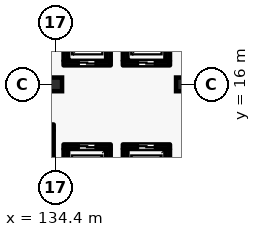
"""IFC4 building model, lengths in metres.
Left out: names, types, materials, properties, quantities, classifications, styles, units other than length and angle.
Written with IfcOpenShell. Run it as: python <this file> out.ifc"""

import sys

from ifc_helpers import new_model, si_unit, direction, frame, frame_2d, origin, origin_2d, place, context, subcontext, project, spatial, rectangle, extrude, element, fill, save


model = new_model("IFC4")
c1 = context("Model", 3, precision=1e-05, world=origin(), true_north=direction((0.0, 1.0)))
c2 = subcontext(c1, "Body", "Model", "MODEL_VIEW")
j1 = project(units=[si_unit("LENGTHUNIT", "METRE"), si_unit("PLANEANGLEUNIT", "RADIAN")], contexts=[c1])
p1 = place(None, origin())
s1 = spatial("IfcSite", under=j1, at=p1, CompositionType="ELEMENT")
p2 = place(p1, origin())
s2 = spatial("IfcBuilding", under=s1, at=p2, CompositionType="ELEMENT")
p3 = place(p2, frame((0.0, 0.0, 21.0)))
s3 = spatial("IfcBuildingStorey", under=s2, at=p3, CompositionType="ELEMENT", Elevation=21.0)
for number, where, z_axis, x_axis in (
    (1, (134.4, 16.0, 0.0), (0.0, 0.0, 1.0), (1.0, 0.0, 0.0)),
    (2, (142.8, 16.0, 0.0), (0.0, 0.0, 1.0), (1.0, 0.0, 0.0)),
):
    element("IfcColumn", number, at=place(p3, frame(where, z_axis=z_axis, x_axis=x_axis)), inside=s3, PredefinedType="COLUMN", context=c2, shape_type="SweptSolid", body=[
        extrude(rectangle(XDim=0.9, YDim=0.9, at=origin_2d()), origin(), (0.0, 0.0, 1.0), 4.2),
    ])
p4 = place(p3, frame((134.95, 17.4, 0.0), z_axis=(0.0, 0.0, 1.0), x_axis=(1.0, 0.0, 0.0)))
e3 = element("IfcWall", 3, at=p4, inside=s3, PredefinedType="SHEAR", context=c2, shape_type="SweptSolid", body=[
    extrude(rectangle(XDim=3.1, YDim=0.3, at=frame_2d((1.55, 0.0))), origin(), (0.0, 0.0, 1.0), 3.965),
])
p5 = place(p4, frame((1.0, 0.0, 0.0)))
e4 = element("IfcOpeningElement", 4, at=p5, cuts=e3, PredefinedType="OPENING", context=c2, shape_type="SweptSolid", body=[
    extrude(rectangle(XDim=1.1, YDim=2.2, at=frame_2d((0.55, 1.1))), frame((0.0, 0.16, 0.0), z_axis=(0.0, -1.0, 0.0), x_axis=(1.0, 0.0, 0.0)), (0.0, 0.0, 1.0), 0.32),
])
for number, where, z_axis, x_axis in (
    (5, (137.9, 17.555, 0.0), (0.0, 0.0, 1.0), (0.0, 1.0, 0.0)),
    (6, (135.1, 20.145, 0.0), (0.0, 0.0, 1.0), (0.0, -1.0, 0.0)),
):
    element("IfcWall", number, at=place(p3, frame(where, z_axis=z_axis, x_axis=x_axis)), inside=s3, PredefinedType="SHEAR", context=c2, shape_type="SweptSolid", body=[
        extrude(rectangle(XDim=2.59, YDim=0.3, at=frame_2d((1.295, 0.0))), origin(), (0.0, 0.0, 1.0), 3.965),
    ])
p6 = place(p3, frame((138.85, 17.4, 0.0), z_axis=(0.0, 0.0, 1.0), x_axis=(1.0, 0.0, 0.0)))
e7 = element("IfcWall", 7, at=p6, inside=s3, PredefinedType="SHEAR", context=c2, shape_type="SweptSolid", body=[
    extrude(rectangle(XDim=3.1, YDim=0.3, at=frame_2d((1.55, 0.0))), origin(), (0.0, 0.0, 1.0), 3.965),
])
p7 = place(p6, frame((1.0, 0.0, 0.0)))
e8 = element("IfcOpeningElement", 8, at=p7, cuts=e7, PredefinedType="OPENING", context=c2, shape_type="SweptSolid", body=[
    extrude(rectangle(XDim=1.1, YDim=2.2, at=frame_2d((0.55, 1.1))), frame((0.0, 0.16, 0.0), z_axis=(0.0, -1.0, 0.0), x_axis=(1.0, 0.0, 0.0)), (0.0, 0.0, 1.0), 0.32),
])
for number, where, z_axis, x_axis in (
    (9, (141.8, 17.555, 0.0), (0.0, 0.0, 1.0), (0.0, 1.0, 0.0)),
    (10, (139.0, 20.145, 0.0), (0.0, 0.0, 1.0), (0.0, -1.0, 0.0)),
    (11, (137.9, 9.155, 0.0), (0.0, 0.0, 1.0), (0.0, 1.0, 0.0)),
):
    element("IfcWall", number, at=place(p3, frame(where, z_axis=z_axis, x_axis=x_axis)), inside=s3, PredefinedType="SHEAR", context=c2, shape_type="SweptSolid", body=[
        extrude(rectangle(XDim=2.59, YDim=0.3, at=frame_2d((1.295, 0.0))), origin(), (0.0, 0.0, 1.0), 3.965),
    ])
p8 = place(p3, frame((138.05, 11.9, 0.0), z_axis=(0.0, 0.0, 1.0), x_axis=(-1.0, 0.0, 0.0)))
e12 = element("IfcWall", 12, at=p8, inside=s3, PredefinedType="SHEAR", context=c2, shape_type="SweptSolid", body=[
    extrude(rectangle(XDim=3.1, YDim=0.3, at=frame_2d((1.55, 0.0))), origin(), (0.0, 0.0, 1.0), 3.965),
])
p9 = place(p8, frame((1.0, 0.0, 0.0)))
e13 = element("IfcOpeningElement", 13, at=p9, cuts=e12, PredefinedType="OPENING", context=c2, shape_type="SweptSolid", body=[
    extrude(rectangle(XDim=1.1, YDim=2.2, at=frame_2d((0.55, 1.1))), frame((0.0, 0.16, 0.0), z_axis=(0.0, -1.0, 0.0), x_axis=(1.0, 0.0, 0.0)), (0.0, 0.0, 1.0), 0.32),
])
for number, where, z_axis, x_axis in (
    (14, (135.1, 11.745, 0.0), (0.0, 0.0, 1.0), (0.0, -1.0, 0.0)),
    (15, (141.8, 9.155, 0.0), (0.0, 0.0, 1.0), (0.0, 1.0, 0.0)),
):
    element("IfcWall", number, at=place(p3, frame(where, z_axis=z_axis, x_axis=x_axis)), inside=s3, PredefinedType="SHEAR", context=c2, shape_type="SweptSolid", body=[
        extrude(rectangle(XDim=2.59, YDim=0.3, at=frame_2d((1.295, 0.0))), origin(), (0.0, 0.0, 1.0), 3.965),
    ])
p10 = place(p3, frame((141.95, 11.9, 0.0), z_axis=(0.0, 0.0, 1.0), x_axis=(-1.0, 0.0, 0.0)))
e16 = element("IfcWall", 16, at=p10, inside=s3, PredefinedType="SHEAR", context=c2, shape_type="SweptSolid", body=[
    extrude(rectangle(XDim=3.1, YDim=0.3, at=frame_2d((1.55, 0.0))), origin(), (0.0, 0.0, 1.0), 3.965),
])
p11 = place(p10, frame((1.0, 0.0, 0.0)))
e17 = element("IfcOpeningElement", 17, at=p11, cuts=e16, PredefinedType="OPENING", context=c2, shape_type="SweptSolid", body=[
    extrude(rectangle(XDim=1.1, YDim=2.2, at=frame_2d((0.55, 1.1))), frame((0.0, 0.16, 0.0), z_axis=(0.0, -1.0, 0.0), x_axis=(1.0, 0.0, 0.0)), (0.0, 0.0, 1.0), 0.32),
])
p12 = place(p3, frame((139.0, 11.745, 0.0), z_axis=(0.0, 0.0, 1.0), x_axis=(0.0, -1.0, 0.0)))
e18 = element("IfcWall", 18, at=p12, inside=s3, PredefinedType="SHEAR", context=c2, shape_type="SweptSolid", body=[
    extrude(rectangle(XDim=2.59, YDim=0.3, at=frame_2d((1.295, 0.0))), origin(), (0.0, 0.0, 1.0), 3.965),
])
p13 = place(p3, frame((134.1, 9.005, 0.0), z_axis=(0.0, 0.0, 1.0), x_axis=(0.0, 1.0, 0.0)))
e19 = element("IfcWall", 19, at=p13, inside=s3, PredefinedType="SHEAR", context=c2, shape_type="SweptSolid", body=[
    extrude(rectangle(XDim=3.95, YDim=0.4, at=frame_2d((1.975, 0.0))), origin(), (0.0, 0.0, 1.0), 3.965),
])
p14 = place(p3, frame((126.1, 13.16, 0.0), z_axis=(0.0, 0.0, 1.0), x_axis=(1.0, 0.0, 0.0)))
e20 = element("IfcWall", 20, at=p14, inside=s3, PredefinedType="SHEAR", context=c2, shape_type="SweptSolid", body=[
    extrude(rectangle(XDim=8.2, YDim=0.4, at=frame_2d((4.1, 0.0))), origin(), (0.0, 0.0, 1.0), 3.965),
])
p15 = place(p14, frame((0.43, 0.0, 0.0)))
e21 = element("IfcOpeningElement", 21, at=p15, cuts=e20, PredefinedType="OPENING", context=c2, shape_type="SweptSolid", body=[
    extrude(rectangle(XDim=1.16, YDim=2.2, at=frame_2d((0.58, 1.1))), frame((0.0, 0.21, 0.0), z_axis=(0.0, -1.0, 0.0), x_axis=(1.0, 0.0, 0.0)), (0.0, 0.0, 1.0), 0.42),
])
p16 = place(p5, origin())
e22 = element("IfcDoor", 22, at=p16, inside=s3, OperationType="DOUBLE_DOOR_SLIDING", PredefinedType="DOOR", context=c2, shape_type="SweptSolid", body=[
    extrude(rectangle(XDim=1.1, YDim=2.2, at=frame_2d((0.55, 1.1))), frame((0.0, 0.025, 0.0), z_axis=(0.0, -1.0, 0.0), x_axis=(1.0, 0.0, 0.0)), (0.0, 0.0, 1.0), 0.05),
])
fill(e4, e22)
p17 = place(p7, origin())
e23 = element("IfcDoor", 23, at=p17, inside=s3, OperationType="DOUBLE_DOOR_SLIDING", PredefinedType="DOOR", context=c2, shape_type="SweptSolid", body=[
    extrude(rectangle(XDim=1.1, YDim=2.2, at=frame_2d((0.55, 1.1))), frame((0.0, 0.025, 0.0), z_axis=(0.0, -1.0, 0.0), x_axis=(1.0, 0.0, 0.0)), (0.0, 0.0, 1.0), 0.05),
])
fill(e8, e23)
p18 = place(p9, origin())
e24 = element("IfcDoor", 24, at=p18, inside=s3, OperationType="DOUBLE_DOOR_SLIDING", PredefinedType="DOOR", context=c2, shape_type="SweptSolid", body=[
    extrude(rectangle(XDim=1.1, YDim=2.2, at=frame_2d((0.55, 1.1))), frame((0.0, 0.025, 0.0), z_axis=(0.0, -1.0, 0.0), x_axis=(1.0, 0.0, 0.0)), (0.0, 0.0, 1.0), 0.05),
])
fill(e13, e24)
p19 = place(p11, origin())
e25 = element("IfcDoor", 25, at=p19, inside=s3, OperationType="DOUBLE_DOOR_SLIDING", PredefinedType="DOOR", context=c2, shape_type="SweptSolid", body=[
    extrude(rectangle(XDim=1.1, YDim=2.2, at=frame_2d((0.55, 1.1))), frame((0.0, 0.025, 0.0), z_axis=(0.0, -1.0, 0.0), x_axis=(1.0, 0.0, 0.0)), (0.0, 0.0, 1.0), 0.05),
])
fill(e17, e25)
save(model, sys.argv[1])
